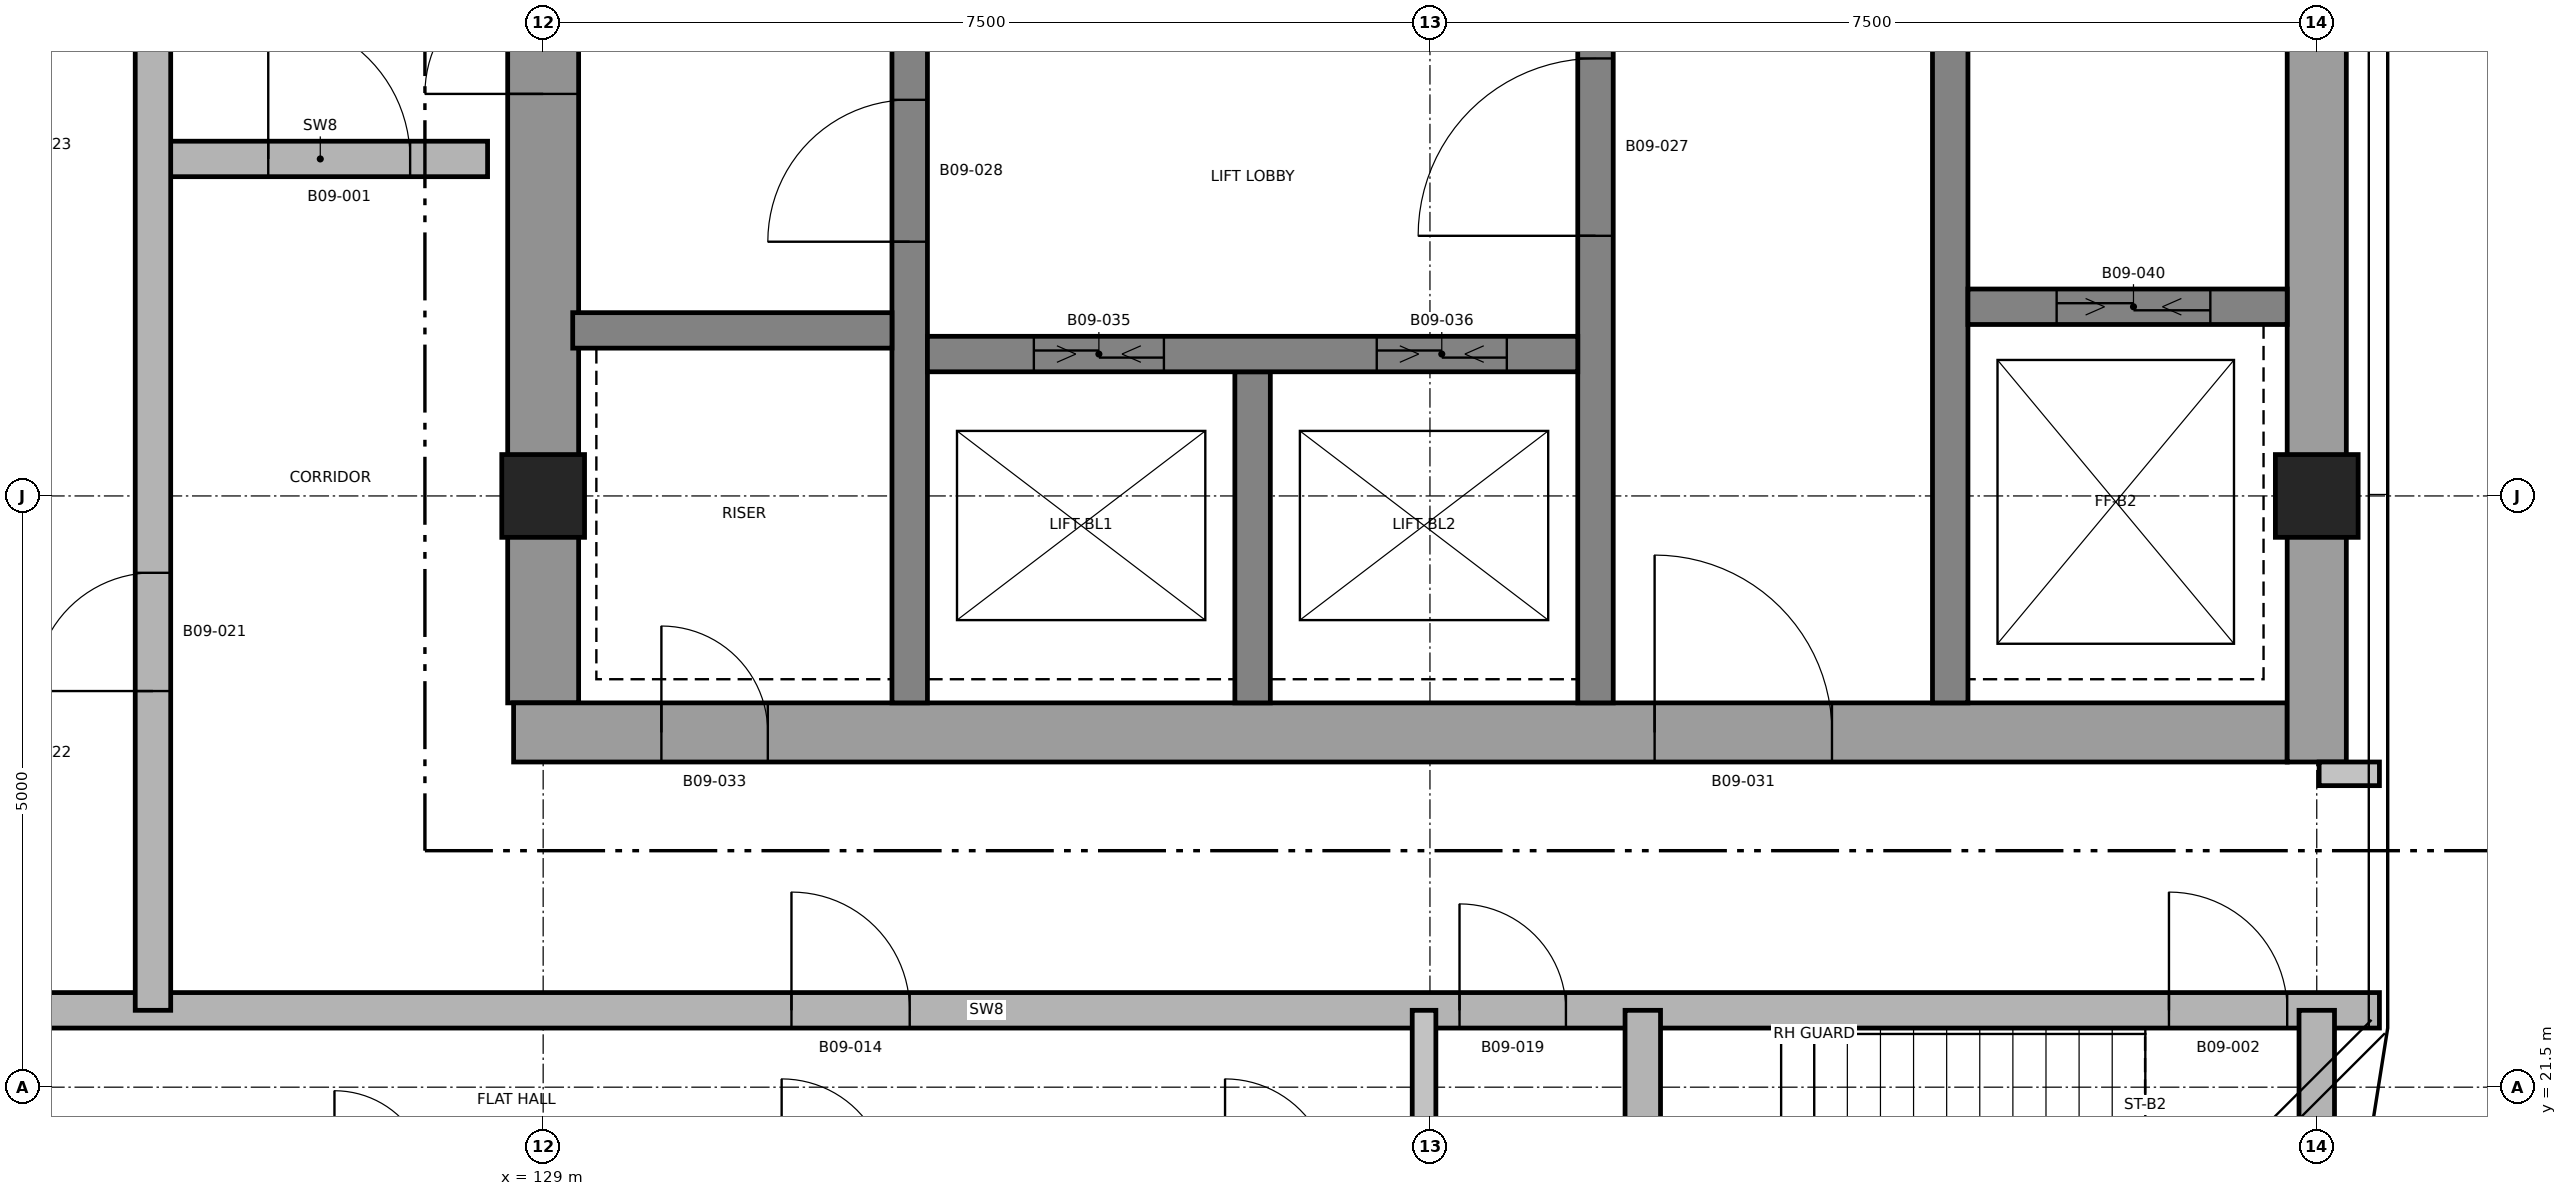
"""IFC4 building model, lengths in metres.
Left out: names, types, materials, properties, quantities, classifications, styles, units other than length and angle.
Written with IfcOpenShell. Run it as: python <this file> out.ifc"""

import sys

from ifc_helpers import new_model, si_unit, direction, frame, frame_2d, origin, origin_2d, place, context, subcontext, project, spatial, rectangle, extrude, element, fill, save


model = new_model("IFC4")
c1 = context("Model", 3, precision=1e-05, world=origin(), true_north=direction((0.0, 1.0)))
c2 = subcontext(c1, "Body", "Model", "MODEL_VIEW")
j1 = project(units=[si_unit("LENGTHUNIT", "METRE"), si_unit("PLANEANGLEUNIT", "RADIAN")], contexts=[c1])
p1 = place(None, origin())
s1 = spatial("IfcSite", under=j1, at=p1, CompositionType="ELEMENT")
p2 = place(p1, origin())
s2 = spatial("IfcBuilding", under=s1, at=p2, CompositionType="ELEMENT")
p3 = place(p2, frame((0.0, 0.0, 98.2)))
s3 = spatial("IfcBuildingStorey", under=s2, at=p3, CompositionType="ELEMENT", Elevation=98.2)
p4 = place(p3, frame((129.0, 24.75, 0.0), z_axis=(0.0, 0.0, 1.0), x_axis=(0.0, 1.0, 0.0)))
e1 = element("IfcWall", 1, at=p4, inside=s3, PredefinedType="SHEAR", context=c2, shape_type="SweptSolid", body=[
    extrude(rectangle(XDim=12.5, YDim=0.6, at=frame_2d((6.25, 0.0))), origin(), (0.0, 0.0, 1.0), 3.7),
])
p5 = place(p4, frame((5.15, 0.0, 0.0)))
e2 = element("IfcOpeningElement", 2, at=p5, cuts=e1, PredefinedType="OPENING", context=c2, shape_type="SweptSolid", body=[
    extrude(rectangle(XDim=1.0, YDim=2.1, at=frame_2d((0.5, 1.05))), frame((0.0, 0.31, 0.0), z_axis=(0.0, -1.0, 0.0), x_axis=(1.0, 0.0, 0.0)), (0.0, 0.0, 1.0), 0.62),
])
p6 = place(p3, frame((128.75, 24.5, 0.0), z_axis=(0.0, 0.0, 1.0), x_axis=(1.0, 0.0, 0.0)))
e3 = element("IfcWall", 3, at=p6, inside=s3, PredefinedType="SHEAR", context=c2, shape_type="SweptSolid", body=[
    extrude(rectangle(XDim=15.0, YDim=0.5, at=frame_2d((7.5, 0.0))), origin(), (0.0, 0.0, 1.0), 3.7),
])
p7 = place(p6, frame((9.65, 0.0, 0.0)))
e4 = element("IfcOpeningElement", 4, at=p7, cuts=e3, PredefinedType="OPENING", context=c2, shape_type="SweptSolid", body=[
    extrude(rectangle(XDim=1.5, YDim=2.1, at=frame_2d((0.75, 1.05))), frame((0.0, 0.26, 0.0), z_axis=(0.0, -1.0, 0.0), x_axis=(1.0, 0.0, 0.0)), (0.0, 0.0, 1.0), 0.52),
])
p8 = place(p6, frame((1.25, 0.0, 0.0)))
e5 = element("IfcOpeningElement", 5, at=p8, cuts=e3, PredefinedType="OPENING", context=c2, shape_type="SweptSolid", body=[
    extrude(rectangle(XDim=0.9, YDim=2.1, at=frame_2d((0.45, 1.05))), frame((0.0, 0.26, 0.0), z_axis=(0.0, -1.0, 0.0), x_axis=(1.0, 0.0, 0.0)), (0.0, 0.0, 1.0), 0.52),
])
p9 = place(p3, frame((144.0, 24.25, 0.0), z_axis=(0.0, 0.0, 1.0), x_axis=(0.0, 1.0, 0.0)))
e6 = element("IfcWall", 6, at=p9, inside=s3, PredefinedType="SHEAR", context=c2, shape_type="SweptSolid", body=[
    extrude(rectangle(XDim=13.5, YDim=0.5, at=frame_2d((6.75, 0.0))), origin(), (0.0, 0.0, 1.0), 3.7),
])
p10 = place(p3, frame((132.1, 24.75, 0.0), z_axis=(0.0, 0.0, 1.0), x_axis=(0.0, 1.0, 0.0)))
e7 = element("IfcWall", 7, at=p10, inside=s3, PredefinedType="SHEAR", context=c2, shape_type="SweptSolid", body=[
    extrude(rectangle(XDim=12.5, YDim=0.3, at=frame_2d((6.25, 0.0))), origin(), (0.0, 0.0, 1.0), 3.7),
])
p11 = place(p10, frame((3.9, 0.0, 0.0)))
e8 = element("IfcOpeningElement", 8, at=p11, cuts=e7, PredefinedType="OPENING", context=c2, shape_type="SweptSolid", body=[
    extrude(rectangle(XDim=1.2, YDim=2.1, at=frame_2d((0.6, 1.05))), frame((0.0, 0.16, 0.0), z_axis=(0.0, -1.0, 0.0), x_axis=(1.0, 0.0, 0.0)), (0.0, 0.0, 1.0), 0.32),
])
p12 = place(p3, frame((137.9, 24.75, 0.0), z_axis=(0.0, 0.0, 1.0), x_axis=(0.0, 1.0, 0.0)))
e9 = element("IfcWall", 9, at=p12, inside=s3, PredefinedType="SHEAR", context=c2, shape_type="SweptSolid", body=[
    extrude(rectangle(XDim=12.5, YDim=0.3, at=frame_2d((6.25, 0.0))), origin(), (0.0, 0.0, 1.0), 3.7),
])
p13 = place(p12, frame((3.95, 0.0, 0.0)))
e10 = element("IfcOpeningElement", 10, at=p13, cuts=e9, PredefinedType="OPENING", context=c2, shape_type="SweptSolid", body=[
    extrude(rectangle(XDim=1.5, YDim=2.1, at=frame_2d((0.75, 1.05))), frame((0.0, 0.16, 0.0), z_axis=(0.0, -1.0, 0.0), x_axis=(1.0, 0.0, 0.0)), (0.0, 0.0, 1.0), 0.32),
])
p14 = place(p12, frame((10.45, 0.0, 0.0)))
e11 = element("IfcOpeningElement", 11, at=p14, cuts=e9, PredefinedType="OPENING", context=c2, shape_type="SweptSolid", body=[
    extrude(rectangle(XDim=0.9, YDim=2.1, at=frame_2d((0.45, 1.05))), frame((0.0, 0.16, 0.0), z_axis=(0.0, -1.0, 0.0), x_axis=(1.0, 0.0, 0.0)), (0.0, 0.0, 1.0), 0.32),
])
p15 = place(p3, frame((140.9, 24.75, 0.0), z_axis=(0.0, 0.0, 1.0), x_axis=(0.0, 1.0, 0.0)))
e12 = element("IfcWall", 12, at=p15, inside=s3, PredefinedType="SHEAR", context=c2, shape_type="SweptSolid", body=[
    extrude(rectangle(XDim=12.5, YDim=0.3, at=frame_2d((6.25, 0.0))), origin(), (0.0, 0.0, 1.0), 3.7),
])
p16 = place(p15, frame((5.9, 0.0, 0.0)))
e13 = element("IfcOpeningElement", 13, at=p16, cuts=e12, PredefinedType="OPENING", context=c2, shape_type="SweptSolid", body=[
    extrude(rectangle(XDim=1.2, YDim=2.1, at=frame_2d((0.6, 1.05))), frame((0.0, 0.16, 0.0), z_axis=(0.0, -1.0, 0.0), x_axis=(1.0, 0.0, 0.0)), (0.0, 0.0, 1.0), 0.32),
])
p17 = place(p3, frame((135.0, 24.75, 0.0), z_axis=(0.0, 0.0, 1.0), x_axis=(0.0, 1.0, 0.0)))
e14 = element("IfcWall", 14, at=p17, inside=s3, PredefinedType="SHEAR", context=c2, shape_type="SweptSolid", body=[
    extrude(rectangle(XDim=2.8, YDim=0.3, at=frame_2d((1.4, 0.0))), origin(), (0.0, 0.0, 1.0), 3.7),
])
p18 = place(p3, frame((132.25, 27.7, 0.0), z_axis=(0.0, 0.0, 1.0), x_axis=(1.0, 0.0, 0.0)))
e15 = element("IfcWall", 15, at=p18, inside=s3, PredefinedType="SHEAR", context=c2, shape_type="SweptSolid", body=[
    extrude(rectangle(XDim=5.5, YDim=0.3, at=frame_2d((2.75, 0.0))), origin(), (0.0, 0.0, 1.0), 3.7),
])
p19 = place(p18, frame((0.9, 0.0, 0.0)))
e16 = element("IfcOpeningElement", 16, at=p19, cuts=e15, PredefinedType="OPENING", context=c2, shape_type="SweptSolid", body=[
    extrude(rectangle(XDim=1.1, YDim=2.4, at=frame_2d((0.55, 1.2))), frame((0.0, 0.16, 0.0), z_axis=(0.0, -1.0, 0.0), x_axis=(1.0, 0.0, 0.0)), (0.0, 0.0, 1.0), 0.32),
])
p20 = place(p18, frame((3.8, 0.0, 0.0)))
e17 = element("IfcOpeningElement", 17, at=p20, cuts=e15, PredefinedType="OPENING", context=c2, shape_type="SweptSolid", body=[
    extrude(rectangle(XDim=1.1, YDim=2.4, at=frame_2d((0.55, 1.2))), frame((0.0, 0.16, 0.0), z_axis=(0.0, -1.0, 0.0), x_axis=(1.0, 0.0, 0.0)), (0.0, 0.0, 1.0), 0.32),
])
p21 = place(p3, frame((129.25, 27.9, 0.0), z_axis=(0.0, 0.0, 1.0), x_axis=(1.0, 0.0, 0.0)))
e18 = element("IfcWall", 18, at=p21, inside=s3, PredefinedType="SHEAR", context=c2, shape_type="SweptSolid", body=[
    extrude(rectangle(XDim=2.7, YDim=0.3, at=frame_2d((1.35, 0.0))), origin(), (0.0, 0.0, 1.0), 3.7),
])
p22 = place(p3, frame((141.05, 28.1, 0.0), z_axis=(0.0, 0.0, 1.0), x_axis=(1.0, 0.0, 0.0)))
e19 = element("IfcWall", 19, at=p22, inside=s3, PredefinedType="SHEAR", context=c2, shape_type="SweptSolid", body=[
    extrude(rectangle(XDim=2.7, YDim=0.3, at=frame_2d((1.35, 0.0))), origin(), (0.0, 0.0, 1.0), 3.7),
])
p23 = place(p22, frame((0.75, 0.0, 0.0)))
e20 = element("IfcOpeningElement", 20, at=p23, cuts=e19, PredefinedType="OPENING", context=c2, shape_type="SweptSolid", body=[
    extrude(rectangle(XDim=1.3, YDim=2.4, at=frame_2d((0.65, 1.2))), frame((0.0, 0.16, 0.0), z_axis=(0.0, -1.0, 0.0), x_axis=(1.0, 0.0, 0.0)), (0.0, 0.0, 1.0), 0.32),
])
for number, where, z_axis, x_axis in (
    (21, (129.0, 26.5, 0.0), (0.0, 0.0, 1.0), (1.0, 0.0, 0.0)),
    (22, (144.0, 26.5, 0.0), (0.0, 0.0, 1.0), (1.0, 0.0, 0.0)),
):
    element("IfcColumn", number, at=place(p3, frame(where, z_axis=z_axis, x_axis=x_axis)), inside=s3, PredefinedType="COLUMN", context=c2, shape_type="SweptSolid", body=[
        extrude(rectangle(XDim=0.7, YDim=0.7, at=origin_2d()), origin(), (0.0, 0.0, 1.0), 3.7),
    ])
p24 = place(p3, frame((120.97, 22.15, 0.0), z_axis=(0.0, 0.0, 1.0), x_axis=(1.0, 0.0, 0.0)))
e23 = element("IfcWall", 23, at=p24, inside=s3, PredefinedType="SHEAR", context=c2, shape_type="SweptSolid", body=[
    extrude(rectangle(XDim=23.56, YDim=0.3, at=frame_2d((11.78, 0.0))), origin(), (0.0, 0.0, 1.0), 3.4),
])
p25 = place(p24, frame((21.78, 0.0, 0.0)))
e24 = element("IfcOpeningElement", 24, at=p25, cuts=e23, PredefinedType="OPENING", context=c2, shape_type="SweptSolid", body=[
    extrude(rectangle(XDim=1.0, YDim=2.1, at=frame_2d((0.5, 1.05))), frame((0.0, 0.16, 0.0), z_axis=(0.0, -1.0, 0.0), x_axis=(1.0, 0.0, 0.0)), (0.0, 0.0, 1.0), 0.32),
])
p26 = place(p24, frame((10.13, 0.0, 0.0)))
e25 = element("IfcOpeningElement", 25, at=p26, cuts=e23, PredefinedType="OPENING", context=c2, shape_type="SweptSolid", body=[
    extrude(rectangle(XDim=1.0, YDim=2.1, at=frame_2d((0.5, 1.05))), frame((0.0, 0.16, 0.0), z_axis=(0.0, -1.0, 0.0), x_axis=(1.0, 0.0, 0.0)), (0.0, 0.0, 1.0), 0.32),
])
p27 = place(p24, frame((15.78, 0.0, 0.0)))
e26 = element("IfcOpeningElement", 26, at=p27, cuts=e23, PredefinedType="OPENING", context=c2, shape_type="SweptSolid", body=[
    extrude(rectangle(XDim=0.9, YDim=2.1, at=frame_2d((0.45, 1.05))), frame((0.0, 0.16, 0.0), z_axis=(0.0, -1.0, 0.0), x_axis=(1.0, 0.0, 0.0)), (0.0, 0.0, 1.0), 0.32),
])
p28 = place(p3, frame((144.02, 24.15, 0.0), z_axis=(0.0, 0.0, 1.0), x_axis=(1.0, 0.0, 0.0)))
e27 = element("IfcWall", 27, at=p28, inside=s3, PredefinedType="PARTITIONING", context=c2, shape_type="SweptSolid", body=[
    extrude(rectangle(XDim=0.51, YDim=0.2, at=frame_2d((0.255, 0.0))), origin(), (0.0, 0.0, 1.0), 3.4),
])
p29 = place(p3, frame((125.7, 29.35, 0.0), z_axis=(0.0, 0.0, 1.0), x_axis=(1.0, 0.0, 0.0)))
e28 = element("IfcWall", 28, at=p29, inside=s3, PredefinedType="SHEAR", context=c2, shape_type="SweptSolid", body=[
    extrude(rectangle(XDim=2.83, YDim=0.3, at=frame_2d((1.415, 0.0))), origin(), (0.0, 0.0, 1.0), 3.4),
])
p30 = place(p29, frame((0.975, 0.0, 0.0)))
e29 = element("IfcOpeningElement", 29, at=p30, cuts=e28, PredefinedType="OPENING", context=c2, shape_type="SweptSolid", body=[
    extrude(rectangle(XDim=1.2, YDim=2.1, at=frame_2d((0.6, 1.05))), frame((0.0, 0.16, 0.0), z_axis=(0.0, -1.0, 0.0), x_axis=(1.0, 0.0, 0.0)), (0.0, 0.0, 1.0), 0.32),
])
p31 = place(p3, frame((125.7, 22.15, 0.0), z_axis=(0.0, 0.0, 1.0), x_axis=(0.0, 1.0, 0.0)))
e30 = element("IfcWall", 30, at=p31, inside=s3, PredefinedType="SHEAR", context=c2, shape_type="SweptSolid", body=[
    extrude(rectangle(XDim=17.7, YDim=0.3, at=frame_2d((8.85, 0.0))), origin(), (0.0, 0.0, 1.0), 3.4),
])
p32 = place(p31, frame((2.7, 0.0, 0.0)))
e31 = element("IfcOpeningElement", 31, at=p32, cuts=e30, PredefinedType="OPENING", context=c2, shape_type="SweptSolid", body=[
    extrude(rectangle(XDim=1.0, YDim=2.1, at=frame_2d((0.5, 1.05))), frame((0.0, 0.16, 0.0), z_axis=(0.0, -1.0, 0.0), x_axis=(1.0, 0.0, 0.0)), (0.0, 0.0, 1.0), 0.32),
])
p33 = place(p3, frame((136.45, 16.97, 0.0), z_axis=(0.0, 0.0, 1.0), x_axis=(0.0, 1.0, 0.0)))
e32 = element("IfcWall", 32, at=p33, inside=s3, PredefinedType="PARTITIONING", context=c2, shape_type="SweptSolid", body=[
    extrude(rectangle(XDim=5.18, YDim=0.2, at=frame_2d((2.59, 0.0))), origin(), (0.0, 0.0, 1.0), 3.4),
])
p34 = place(p3, frame((138.3, 16.97, 0.0), z_axis=(0.0, 0.0, 1.0), x_axis=(0.0, 1.0, 0.0)))
e33 = element("IfcWall", 33, at=p34, inside=s3, PredefinedType="SHEAR", context=c2, shape_type="SweptSolid", body=[
    extrude(rectangle(XDim=5.18, YDim=0.3, at=frame_2d((2.59, 0.0))), origin(), (0.0, 0.0, 1.0), 3.4),
])
p35 = place(p34, frame((1.13, 0.0, 0.0)))
e34 = element("IfcOpeningElement", 34, at=p35, cuts=e33, PredefinedType="OPENING", context=c2, shape_type="SweptSolid", body=[
    extrude(rectangle(XDim=0.8, YDim=2.1, at=frame_2d((0.4, 1.05))), frame((0.0, 0.16, 0.0), z_axis=(0.0, -1.0, 0.0), x_axis=(1.0, 0.0, 0.0)), (0.0, 0.0, 1.0), 0.32),
])
p36 = place(p3, frame((144.0, 19.891, 0.0), z_axis=(0.0, 0.0, 1.0), x_axis=(0.0, 1.0, 0.0)))
e35 = element("IfcWall", 35, at=p36, inside=s3, PredefinedType="SHEAR", context=c2, shape_type="SweptSolid", body=[
    extrude(rectangle(XDim=2.259, YDim=0.3, at=frame_2d((1.129, 0.0))), origin(), (0.0, 0.0, 1.0), 3.4),
])
p37 = place(p30, origin())
e36 = element("IfcDoor", 36, at=p37, inside=s3, OperationType="SINGLE_SWING_LEFT", PredefinedType="DOOR", context=c2, shape_type="SweptSolid", body=[
    extrude(rectangle(XDim=1.2, YDim=2.1, at=frame_2d((0.6, 1.05))), frame((0.0, 0.025, 0.0), z_axis=(0.0, -1.0, 0.0), x_axis=(1.0, 0.0, 0.0)), (0.0, 0.0, 1.0), 0.05),
])
fill(e29, e36)
p38 = place(p25, origin())
e37 = element("IfcDoor", 37, at=p38, inside=s3, OperationType="SINGLE_SWING_RIGHT", PredefinedType="DOOR", context=c2, shape_type="SweptSolid", body=[
    extrude(rectangle(XDim=1.0, YDim=2.1, at=frame_2d((0.5, 1.05))), frame((0.0, 0.025, 0.0), z_axis=(0.0, -1.0, 0.0), x_axis=(1.0, 0.0, 0.0)), (0.0, 0.0, 1.0), 0.05),
])
fill(e24, e37)
p39 = place(p26, origin())
e38 = element("IfcDoor", 38, at=p39, inside=s3, OperationType="SINGLE_SWING_RIGHT", PredefinedType="DOOR", context=c2, shape_type="SweptSolid", body=[
    extrude(rectangle(XDim=1.0, YDim=2.1, at=frame_2d((0.5, 1.05))), frame((0.0, 0.025, 0.0), z_axis=(0.0, -1.0, 0.0), x_axis=(1.0, 0.0, 0.0)), (0.0, 0.0, 1.0), 0.05),
])
fill(e25, e38)
p40 = place(p27, origin())
e39 = element("IfcDoor", 39, at=p40, inside=s3, OperationType="SINGLE_SWING_LEFT", PredefinedType="DOOR", context=c2, shape_type="SweptSolid", body=[
    extrude(rectangle(XDim=0.9, YDim=2.1, at=frame_2d((0.45, 1.05))), frame((0.0, 0.025, 0.0), z_axis=(0.0, -1.0, 0.0), x_axis=(1.0, 0.0, 0.0)), (0.0, 0.0, 1.0), 0.05),
])
fill(e26, e39)
p41 = place(p32, origin())
e40 = element("IfcDoor", 40, at=p41, inside=s3, OperationType="SINGLE_SWING_LEFT", PredefinedType="DOOR", context=c2, shape_type="SweptSolid", body=[
    extrude(rectangle(XDim=1.0, YDim=2.1, at=frame_2d((0.5, 1.05))), frame((0.0, 0.025, 0.0), z_axis=(0.0, -1.0, 0.0), x_axis=(1.0, 0.0, 0.0)), (0.0, 0.0, 1.0), 0.05),
])
fill(e31, e40)
p42 = place(p13, origin())
e41 = element("IfcDoor", 41, at=p42, inside=s3, OperationType="SINGLE_SWING_RIGHT", PredefinedType="DOOR", context=c2, shape_type="SweptSolid", body=[
    extrude(rectangle(XDim=1.5, YDim=2.1, at=frame_2d((0.75, 1.05))), frame((0.0, 0.025, 0.0), z_axis=(0.0, -1.0, 0.0), x_axis=(1.0, 0.0, 0.0)), (0.0, 0.0, 1.0), 0.05),
])
fill(e10, e41)
p43 = place(p11, origin())
e42 = element("IfcDoor", 42, at=p43, inside=s3, OperationType="SINGLE_SWING_LEFT", PredefinedType="DOOR", context=c2, shape_type="SweptSolid", body=[
    extrude(rectangle(XDim=1.2, YDim=2.1, at=frame_2d((0.6, 1.05))), frame((0.0, 0.025, 0.0), z_axis=(0.0, -1.0, 0.0), x_axis=(1.0, 0.0, 0.0)), (0.0, 0.0, 1.0), 0.05),
])
fill(e8, e42)
p44 = place(p5, origin())
e43 = element("IfcDoor", 43, at=p44, inside=s3, OperationType="SINGLE_SWING_RIGHT", PredefinedType="DOOR", context=c2, shape_type="SweptSolid", body=[
    extrude(rectangle(XDim=1.0, YDim=2.1, at=frame_2d((0.5, 1.05))), frame((0.0, 0.025, 0.0), z_axis=(0.0, -1.0, 0.0), x_axis=(1.0, 0.0, 0.0)), (0.0, 0.0, 1.0), 0.05),
])
fill(e2, e43)
p45 = place(p7, origin())
e44 = element("IfcDoor", 44, at=p45, inside=s3, OperationType="SINGLE_SWING_LEFT", PredefinedType="DOOR", context=c2, shape_type="SweptSolid", body=[
    extrude(rectangle(XDim=1.5, YDim=2.1, at=frame_2d((0.75, 1.05))), frame((0.0, 0.025, 0.0), z_axis=(0.0, -1.0, 0.0), x_axis=(1.0, 0.0, 0.0)), (0.0, 0.0, 1.0), 0.05),
])
fill(e4, e44)
p46 = place(p8, origin())
e45 = element("IfcDoor", 45, at=p46, inside=s3, OperationType="SINGLE_SWING_LEFT", PredefinedType="DOOR", context=c2, shape_type="SweptSolid", body=[
    extrude(rectangle(XDim=0.9, YDim=2.1, at=frame_2d((0.45, 1.05))), frame((0.0, 0.025, 0.0), z_axis=(0.0, -1.0, 0.0), x_axis=(1.0, 0.0, 0.0)), (0.0, 0.0, 1.0), 0.05),
])
fill(e5, e45)
p47 = place(p19, origin())
e46 = element("IfcDoor", 46, at=p47, inside=s3, OperationType="SLIDING_TO_LEFT", PredefinedType="DOOR", context=c2, shape_type="SweptSolid", body=[
    extrude(rectangle(XDim=1.1, YDim=2.4, at=frame_2d((0.55, 1.2))), frame((0.0, 0.025, 0.0), z_axis=(0.0, -1.0, 0.0), x_axis=(1.0, 0.0, 0.0)), (0.0, 0.0, 1.0), 0.05),
])
fill(e16, e46)
p48 = place(p20, origin())
e47 = element("IfcDoor", 47, at=p48, inside=s3, OperationType="SLIDING_TO_LEFT", PredefinedType="DOOR", context=c2, shape_type="SweptSolid", body=[
    extrude(rectangle(XDim=1.1, YDim=2.4, at=frame_2d((0.55, 1.2))), frame((0.0, 0.025, 0.0), z_axis=(0.0, -1.0, 0.0), x_axis=(1.0, 0.0, 0.0)), (0.0, 0.0, 1.0), 0.05),
])
fill(e17, e47)
p49 = place(p23, origin())
e48 = element("IfcDoor", 48, at=p49, inside=s3, OperationType="SLIDING_TO_LEFT", PredefinedType="DOOR", context=c2, shape_type="SweptSolid", body=[
    extrude(rectangle(XDim=1.3, YDim=2.4, at=frame_2d((0.65, 1.2))), frame((0.0, 0.025, 0.0), z_axis=(0.0, -1.0, 0.0), x_axis=(1.0, 0.0, 0.0)), (0.0, 0.0, 1.0), 0.05),
])
fill(e20, e48)
save(model, sys.argv[1])
